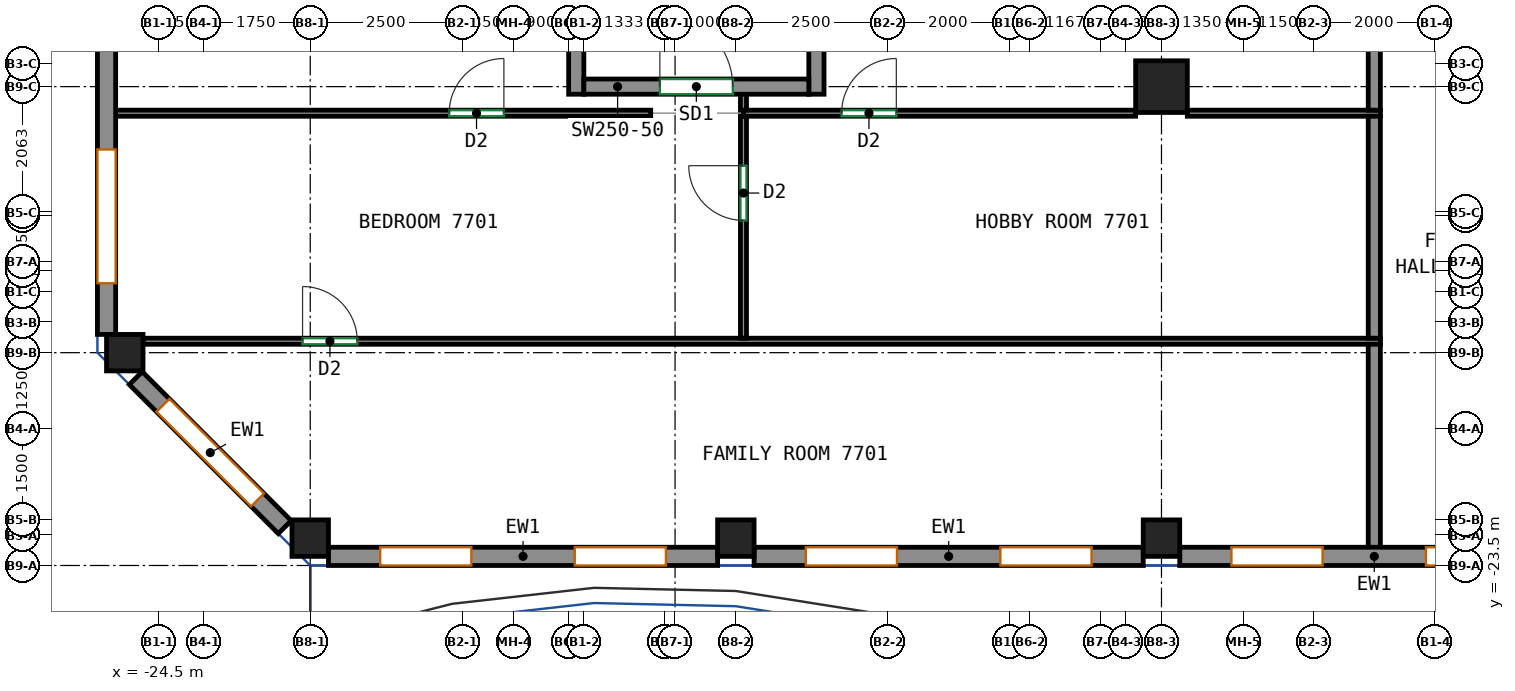
"""IFC4 building model, lengths in metres.
Left out: names, types, materials, properties, quantities, classifications, styles, units other than length and angle.
Written with IfcOpenShell. Run it as: python <this file> out.ifc"""

import sys

from ifc_helpers import new_model, si_unit, direction, frame, frame_2d, origin, origin_2d, place, context, subcontext, project, spatial, rectangle, extrude, source, transform, mapped, element, fill, save


model = new_model("IFC4")
c1 = context("Model", 3, precision=1e-05, world=origin(), true_north=direction((0.0, 1.0)))
c2 = subcontext(c1, "Body", "Model", "MODEL_VIEW")
j1 = project(units=[si_unit("LENGTHUNIT", "METRE"), si_unit("PLANEANGLEUNIT", "RADIAN")], contexts=[c1])
p1 = place(None, origin())
s1 = spatial("IfcSite", under=j1, at=p1, CompositionType="ELEMENT")
p2 = place(p1, origin())
s2 = spatial("IfcBuilding", under=s1, at=p2, CompositionType="ELEMENT")
p3 = place(p2, frame((0.0, 0.0, 308.6)))
s3 = spatial("IfcBuildingStorey", under=s2, at=p3, CompositionType="ELEMENT", Elevation=308.6)
m1 = source(origin(), c2, "Body", "SweptSolid", [
    extrude(rectangle(XDim=0.6, YDim=0.6, at=origin_2d()), origin(), (0.0, 0.0, 1.0), 3.12),
])
for number, where, z_axis, x_axis in (
    (1, (-25.05, -20.0, 0.0), (0.0, 0.0, 1.0), (1.0, 0.0, 0.0)),
    (2, (-22.0, -23.05, 0.0), (0.0, 0.0, 1.0), (1.0, 0.0, 0.0)),
    (3, (-15.0, -23.05, 0.0), (0.0, 0.0, 1.0), (1.0, 0.0, 0.0)),
    (4, (-8.0, -23.05, 0.0), (0.0, 0.0, 1.0), (1.0, 0.0, 0.0)),
):
    element("IfcColumn", number, at=place(p3, frame(where, z_axis=z_axis, x_axis=x_axis)), inside=s3, PredefinedType="COLUMN", context=c2, shape_type="MappedRepresentation", body=[
        mapped(m1, transform((0.0, 0.0, 0.0))),
    ])
m2 = source(origin(), c2, "Body", "SweptSolid", [
    extrude(rectangle(XDim=0.85, YDim=0.85, at=origin_2d()), origin(), (0.0, 0.0, 1.0), 3.12),
])
p4 = place(p3, frame((-8.0, -15.625, 0.0), z_axis=(0.0, 0.0, 1.0), x_axis=(1.0, 0.0, 0.0)))
e5 = element("IfcColumn", 5, at=p4, inside=s3, PredefinedType="COLUMN", context=c2, shape_type="MappedRepresentation", body=[
    mapped(m2, transform((0.0, 0.0, 0.0))),
])
m3 = source(origin(), c2, "Body", "SweptSolid", [
    extrude(rectangle(XDim=8.0, YDim=0.25, at=frame_2d((4.0, 0.0))), origin(), (0.0, 0.0, 1.0), 3.12),
])
for number, where, z_axis, x_axis in (
    (6, (-17.625, -15.75, 0.0), (0.0, 0.0, 1.0), (0.0, 1.0, 0.0)),
    (7, (-13.675, -15.75, 0.0), (0.0, 0.0, 1.0), (0.0, 1.0, 0.0)),
):
    element("IfcWall", number, at=place(p3, frame(where, z_axis=z_axis, x_axis=x_axis)), inside=s3, PredefinedType="SHEAR", context=c2, shape_type="MappedRepresentation", body=[
        mapped(m3, transform((0.0, 0.0, 0.0))),
    ])
m4 = source(origin(), c2, "Body", "SweptSolid", [
    extrude(rectangle(XDim=3.7, YDim=0.25, at=frame_2d((1.85, 0.0))), origin(), (0.0, 0.0, 1.0), 3.12),
])
p5 = place(p3, frame((-17.5, -15.625, 0.0), z_axis=(0.0, 0.0, 1.0), x_axis=(1.0, 0.0, 0.0)))
e8 = element("IfcWall", 8, at=p5, inside=s3, PredefinedType="SHEAR", context=c2, shape_type="MappedRepresentation", body=[
    mapped(m4, transform((0.0, 0.0, 0.0))),
])
p6 = place(p5, frame((1.25, 0.0, 0.0)))
e9 = element("IfcOpeningElement", 9, at=p6, cuts=e8, PredefinedType="OPENING", context=c2, shape_type="SweptSolid", body=[
    extrude(rectangle(XDim=1.2, YDim=2.1, at=frame_2d((0.6, 1.05))), frame((0.0, 0.135, 0.0), z_axis=(0.0, -1.0, 0.0), x_axis=(1.0, 0.0, 0.0)), (0.0, 0.0, 1.0), 0.27),
])
m5 = source(origin(), c2, "Body", "SweptSolid", [
    extrude(rectangle(XDim=6.4, YDim=0.3, at=frame_2d((3.2, 0.0))), origin(), (0.0, 0.0, 1.0), 3.12),
])
p7 = place(p3, frame((-21.7, -23.35, 0.0), z_axis=(0.0, 0.0, 1.0), x_axis=(1.0, 0.0, 0.0)))
e10 = element("IfcWall", 10, at=p7, inside=s3, PredefinedType="SOLIDWALL", context=c2, shape_type="MappedRepresentation", body=[
    mapped(m5, transform((0.0, 0.0, 0.0))),
])
p8 = place(p7, frame((0.85, 0.0, 0.8)))
e11 = element("IfcOpeningElement", 11, at=p8, cuts=e10, PredefinedType="OPENING", context=c2, shape_type="SweptSolid", body=[
    extrude(rectangle(XDim=1.5, YDim=2.05, at=frame_2d((0.75, 1.025))), frame((0.0, 0.16, 0.0), z_axis=(0.0, -1.0, 0.0), x_axis=(1.0, 0.0, 0.0)), (0.0, 0.0, 1.0), 0.32),
])
p9 = place(p7, frame((4.05, 0.0, 0.8)))
e12 = element("IfcOpeningElement", 12, at=p9, cuts=e10, PredefinedType="OPENING", context=c2, shape_type="SweptSolid", body=[
    extrude(rectangle(XDim=1.5, YDim=2.05, at=frame_2d((0.75, 1.025))), frame((0.0, 0.16, 0.0), z_axis=(0.0, -1.0, 0.0), x_axis=(1.0, 0.0, 0.0)), (0.0, 0.0, 1.0), 0.32),
])
p10 = place(p3, frame((-14.7, -23.35, 0.0), z_axis=(0.0, 0.0, 1.0), x_axis=(1.0, 0.0, 0.0)))
e13 = element("IfcWall", 13, at=p10, inside=s3, PredefinedType="SOLIDWALL", context=c2, shape_type="MappedRepresentation", body=[
    mapped(m5, transform((0.0, 0.0, 0.0))),
])
p11 = place(p10, frame((0.85, 0.0, 0.8)))
e14 = element("IfcOpeningElement", 14, at=p11, cuts=e13, PredefinedType="OPENING", context=c2, shape_type="SweptSolid", body=[
    extrude(rectangle(XDim=1.5, YDim=2.05, at=frame_2d((0.75, 1.025))), frame((0.0, 0.16, 0.0), z_axis=(0.0, -1.0, 0.0), x_axis=(1.0, 0.0, 0.0)), (0.0, 0.0, 1.0), 0.32),
])
p12 = place(p10, frame((4.05, 0.0, 0.8)))
e15 = element("IfcOpeningElement", 15, at=p12, cuts=e13, PredefinedType="OPENING", context=c2, shape_type="SweptSolid", body=[
    extrude(rectangle(XDim=1.5, YDim=2.05, at=frame_2d((0.75, 1.025))), frame((0.0, 0.16, 0.0), z_axis=(0.0, -1.0, 0.0), x_axis=(1.0, 0.0, 0.0)), (0.0, 0.0, 1.0), 0.32),
])
p13 = place(p3, frame((-7.7, -23.35, 0.0), z_axis=(0.0, 0.0, 1.0), x_axis=(1.0, 0.0, 0.0)))
e16 = element("IfcWall", 16, at=p13, inside=s3, PredefinedType="SOLIDWALL", context=c2, shape_type="MappedRepresentation", body=[
    mapped(m5, transform((0.0, 0.0, 0.0))),
])
p14 = place(p13, frame((0.85, 0.0, 0.8)))
e17 = element("IfcOpeningElement", 17, at=p14, cuts=e16, PredefinedType="OPENING", context=c2, shape_type="SweptSolid", body=[
    extrude(rectangle(XDim=1.5, YDim=2.05, at=frame_2d((0.75, 1.025))), frame((0.0, 0.16, 0.0), z_axis=(0.0, -1.0, 0.0), x_axis=(1.0, 0.0, 0.0)), (0.0, 0.0, 1.0), 0.32),
])
p15 = place(p13, frame((4.05, 0.0, 0.8)))
e18 = element("IfcOpeningElement", 18, at=p15, cuts=e16, PredefinedType="OPENING", context=c2, shape_type="SweptSolid", body=[
    extrude(rectangle(XDim=1.5, YDim=2.05, at=frame_2d((0.75, 1.025))), frame((0.0, 0.16, 0.0), z_axis=(0.0, -1.0, 0.0), x_axis=(1.0, 0.0, 0.0)), (0.0, 0.0, 1.0), 0.32),
])
m6 = source(origin(), c2, "Body", "SweptSolid", [
    extrude(rectangle(XDim=11.65, YDim=0.3, at=frame_2d((5.825, 0.0))), origin(), (0.0, 0.0, 1.0), 3.12),
])
p16 = place(p3, frame((-25.35, -8.05, 0.0), z_axis=(0.0, 0.0, 1.0), x_axis=(0.0, -1.0, 0.0)))
e19 = element("IfcWall", 19, at=p16, inside=s3, PredefinedType="SOLIDWALL", context=c2, shape_type="MappedRepresentation", body=[
    mapped(m6, transform((0.0, 0.0, 0.0))),
])
p17 = place(p16, frame((0.842, 0.0, 0.8)))
e20 = element("IfcOpeningElement", 20, at=p17, cuts=e19, PredefinedType="OPENING", context=c2, shape_type="SweptSolid", body=[
    extrude(rectangle(XDim=2.2, YDim=2.05, at=frame_2d((1.1, 1.025))), frame((0.0, 0.16, 0.0), z_axis=(0.0, -1.0, 0.0), x_axis=(1.0, 0.0, 0.0)), (0.0, 0.0, 1.0), 0.32),
])
p18 = place(p16, frame((4.725, 0.0, 0.8)))
e21 = element("IfcOpeningElement", 21, at=p18, cuts=e19, PredefinedType="OPENING", context=c2, shape_type="SweptSolid", body=[
    extrude(rectangle(XDim=2.2, YDim=2.05, at=frame_2d((1.1, 1.025))), frame((0.0, 0.16, 0.0), z_axis=(0.0, -1.0, 0.0), x_axis=(1.0, 0.0, 0.0)), (0.0, 0.0, 1.0), 0.32),
])
p19 = place(p16, frame((8.608, 0.0, 0.8)))
e22 = element("IfcOpeningElement", 22, at=p19, cuts=e19, PredefinedType="OPENING", context=c2, shape_type="SweptSolid", body=[
    extrude(rectangle(XDim=2.2, YDim=2.05, at=frame_2d((1.1, 1.025))), frame((0.0, 0.16, 0.0), z_axis=(0.0, -1.0, 0.0), x_axis=(1.0, 0.0, 0.0)), (0.0, 0.0, 1.0), 0.32),
])
m7 = source(origin(), c2, "Body", "SweptSolid", [
    extrude(rectangle(XDim=3.465, YDim=0.3, at=frame_2d((1.732, 0.0))), origin(), (0.0, 0.0, 1.0), 3.12),
])
p20 = place(p3, frame((-24.869, -20.419, 0.0), z_axis=(0.0, 0.0, 1.0), x_axis=(0.707106781187, -0.707106781187, 0.0)))
e23 = element("IfcWall", 23, at=p20, inside=s3, PredefinedType="SOLIDWALL", context=c2, shape_type="MappedRepresentation", body=[
    mapped(m7, transform((0.0, 0.0, 0.0))),
])
p21 = place(p20, frame((0.632, 0.0, 0.8)))
e24 = element("IfcOpeningElement", 24, at=p21, cuts=e23, PredefinedType="OPENING", context=c2, shape_type="SweptSolid", body=[
    extrude(rectangle(XDim=2.2, YDim=2.05, at=frame_2d((1.1, 1.025))), frame((0.0, 0.16, 0.0), z_axis=(0.0, -1.0, 0.0), x_axis=(1.0, 0.0, 0.0)), (0.0, 0.0, 1.0), 0.32),
])
p22 = place(p3, frame((-24.75, -19.812, 0.0), z_axis=(0.0, 0.0, 1.0), x_axis=(1.0, 0.0, 0.0)))
e25 = element("IfcWall", 25, at=p22, inside=s3, PredefinedType="PARTITIONING", context=c2, shape_type="SweptSolid", body=[
    extrude(rectangle(XDim=20.35, YDim=0.1, at=frame_2d((10.175, 0.0))), origin(), (0.0, 0.0, 1.0), 3.12),
])
p23 = place(p22, frame((2.624, 0.0, 0.0)))
e26 = element("IfcOpeningElement", 26, at=p23, cuts=e25, PredefinedType="OPENING", context=c2, shape_type="SweptSolid", body=[
    extrude(rectangle(XDim=0.9, YDim=2.1, at=frame_2d((0.45, 1.05))), frame((0.0, 0.06, 0.0), z_axis=(0.0, -1.0, 0.0), x_axis=(1.0, 0.0, 0.0)), (0.0, 0.0, 1.0), 0.12),
])
p24 = place(p3, frame((-4.5, -23.25, 0.0), z_axis=(0.0, 0.0, 1.0), x_axis=(0.0, 1.0, 0.0)))
e27 = element("IfcWall", 27, at=p24, inside=s3, PredefinedType="PARTITIONING", context=c2, shape_type="SweptSolid", body=[
    extrude(rectangle(XDim=3.388, YDim=0.2, at=frame_2d((1.694, 0.0))), origin(), (0.0, 0.0, 1.0), 3.12),
])
p25 = place(p3, frame((-14.875, -19.762, 0.0), z_axis=(0.0, 0.0, 1.0), x_axis=(0.0, 1.0, 0.0)))
e28 = element("IfcWall", 28, at=p25, inside=s3, PredefinedType="PARTITIONING", context=c2, shape_type="SweptSolid", body=[
    extrude(rectangle(XDim=3.65, YDim=0.1, at=frame_2d((1.825, 0.0))), origin(), (0.0, 0.0, 1.0), 3.12),
])
p26 = place(p25, frame((1.937, 0.0, 0.0)))
e29 = element("IfcOpeningElement", 29, at=p26, cuts=e28, PredefinedType="OPENING", context=c2, shape_type="SweptSolid", body=[
    extrude(rectangle(XDim=0.9, YDim=2.1, at=frame_2d((0.45, 1.05))), frame((0.0, 0.06, 0.0), z_axis=(0.0, -1.0, 0.0), x_axis=(1.0, 0.0, 0.0)), (0.0, 0.0, 1.0), 0.12),
])
p27 = place(p3, frame((-25.25, -16.062, 0.0), z_axis=(0.0, 0.0, 1.0), x_axis=(1.0, 0.0, 0.0)))
e30 = element("IfcWall", 30, at=p27, inside=s3, PredefinedType="PARTITIONING", context=c2, shape_type="SweptSolid", body=[
    extrude(rectangle(XDim=8.85, YDim=0.1, at=frame_2d((4.425, 0.0))), origin(), (0.0, 0.0, 1.0), 3.12),
])
p28 = place(p27, frame((5.535, 0.0, 0.0)))
e31 = element("IfcOpeningElement", 31, at=p28, cuts=e30, PredefinedType="OPENING", context=c2, shape_type="SweptSolid", body=[
    extrude(rectangle(XDim=0.9, YDim=2.1, at=frame_2d((0.45, 1.05))), frame((0.0, 0.06, 0.0), z_axis=(0.0, -1.0, 0.0), x_axis=(1.0, 0.0, 0.0)), (0.0, 0.0, 1.0), 0.12),
])
p29 = place(p3, frame((-7.575, -16.062, 0.0), z_axis=(0.0, 0.0, 1.0), x_axis=(1.0, 0.0, 0.0)))
e32 = element("IfcWall", 32, at=p29, inside=s3, PredefinedType="PARTITIONING", context=c2, shape_type="SweptSolid", body=[
    extrude(rectangle(XDim=3.175, YDim=0.1, at=frame_2d((1.587, 0.0))), origin(), (0.0, 0.0, 1.0), 3.12),
])
p30 = place(p3, frame((-14.875, -16.062, 0.0), z_axis=(0.0, 0.0, 1.0), x_axis=(1.0, 0.0, 0.0)))
e33 = element("IfcWall", 33, at=p30, inside=s3, PredefinedType="PARTITIONING", context=c2, shape_type="SweptSolid", body=[
    extrude(rectangle(XDim=6.45, YDim=0.1, at=frame_2d((3.225, 0.0))), origin(), (0.0, 0.0, 1.0), 3.12),
])
p31 = place(p30, frame((1.614, 0.0, 0.0)))
e34 = element("IfcOpeningElement", 34, at=p31, cuts=e33, PredefinedType="OPENING", context=c2, shape_type="SweptSolid", body=[
    extrude(rectangle(XDim=0.9, YDim=2.1, at=frame_2d((0.45, 1.05))), frame((0.0, 0.06, 0.0), z_axis=(0.0, -1.0, 0.0), x_axis=(1.0, 0.0, 0.0)), (0.0, 0.0, 1.0), 0.12),
])
p32 = place(p3, frame((-4.5, -19.762, 0.0), z_axis=(0.0, 0.0, 1.0), x_axis=(0.0, 1.0, 0.0)))
e35 = element("IfcWall", 35, at=p32, inside=s3, PredefinedType="PARTITIONING", context=c2, shape_type="SweptSolid", body=[
    extrude(rectangle(XDim=3.65, YDim=0.2, at=frame_2d((1.825, 0.0))), origin(), (0.0, 0.0, 1.0), 3.12),
])
p33 = place(p3, frame((-14.875, -16.012, 0.0), z_axis=(0.0, 0.0, 1.0), x_axis=(0.0, 1.0, 0.0)))
e36 = element("IfcWall", 36, at=p33, inside=s3, PredefinedType="PARTITIONING", context=c2, shape_type="SweptSolid", body=[
    extrude(rectangle(XDim=0.312, YDim=0.1, at=frame_2d((0.156, 0.0))), origin(), (0.0, 0.0, 1.0), 3.12),
])
p34 = place(p3, frame((-4.5, -16.012, 0.0), z_axis=(0.0, 0.0, 1.0), x_axis=(0.0, 1.0, 0.0)))
e37 = element("IfcWall", 37, at=p34, inside=s3, PredefinedType="PARTITIONING", context=c2, shape_type="SweptSolid", body=[
    extrude(rectangle(XDim=3.7, YDim=0.2, at=frame_2d((1.85, 0.0))), origin(), (0.0, 0.0, 1.0), 3.12),
])
p35 = place(p8, origin())
e38 = element("IfcWindow", 38, at=p35, inside=s3, PartitioningType="SINGLE_PANEL", PredefinedType="WINDOW", context=c2, shape_type="SweptSolid", body=[
    extrude(rectangle(XDim=1.5, YDim=2.05, at=frame_2d((0.75, 1.025))), frame((0.0, 0.03, 0.0), z_axis=(0.0, -1.0, 0.0), x_axis=(1.0, 0.0, 0.0)), (0.0, 0.0, 1.0), 0.06),
])
fill(e11, e38)
p36 = place(p9, origin())
e39 = element("IfcWindow", 39, at=p36, inside=s3, PartitioningType="SINGLE_PANEL", PredefinedType="WINDOW", context=c2, shape_type="SweptSolid", body=[
    extrude(rectangle(XDim=1.5, YDim=2.05, at=frame_2d((0.75, 1.025))), frame((0.0, 0.03, 0.0), z_axis=(0.0, -1.0, 0.0), x_axis=(1.0, 0.0, 0.0)), (0.0, 0.0, 1.0), 0.06),
])
fill(e12, e39)
p37 = place(p11, origin())
e40 = element("IfcWindow", 40, at=p37, inside=s3, PartitioningType="SINGLE_PANEL", PredefinedType="WINDOW", context=c2, shape_type="SweptSolid", body=[
    extrude(rectangle(XDim=1.5, YDim=2.05, at=frame_2d((0.75, 1.025))), frame((0.0, 0.03, 0.0), z_axis=(0.0, -1.0, 0.0), x_axis=(1.0, 0.0, 0.0)), (0.0, 0.0, 1.0), 0.06),
])
fill(e14, e40)
p38 = place(p12, origin())
e41 = element("IfcWindow", 41, at=p38, inside=s3, PartitioningType="SINGLE_PANEL", PredefinedType="WINDOW", context=c2, shape_type="SweptSolid", body=[
    extrude(rectangle(XDim=1.5, YDim=2.05, at=frame_2d((0.75, 1.025))), frame((0.0, 0.03, 0.0), z_axis=(0.0, -1.0, 0.0), x_axis=(1.0, 0.0, 0.0)), (0.0, 0.0, 1.0), 0.06),
])
fill(e15, e41)
p39 = place(p14, origin())
e42 = element("IfcWindow", 42, at=p39, inside=s3, PartitioningType="SINGLE_PANEL", PredefinedType="WINDOW", context=c2, shape_type="SweptSolid", body=[
    extrude(rectangle(XDim=1.5, YDim=2.05, at=frame_2d((0.75, 1.025))), frame((0.0, 0.03, 0.0), z_axis=(0.0, -1.0, 0.0), x_axis=(1.0, 0.0, 0.0)), (0.0, 0.0, 1.0), 0.06),
])
fill(e17, e42)
p40 = place(p15, origin())
e43 = element("IfcWindow", 43, at=p40, inside=s3, PartitioningType="SINGLE_PANEL", PredefinedType="WINDOW", context=c2, shape_type="SweptSolid", body=[
    extrude(rectangle(XDim=1.5, YDim=2.05, at=frame_2d((0.75, 1.025))), frame((0.0, 0.03, 0.0), z_axis=(0.0, -1.0, 0.0), x_axis=(1.0, 0.0, 0.0)), (0.0, 0.0, 1.0), 0.06),
])
fill(e18, e43)
p41 = place(p19, origin())
e44 = element("IfcWindow", 44, at=p41, inside=s3, PartitioningType="SINGLE_PANEL", PredefinedType="WINDOW", context=c2, shape_type="SweptSolid", body=[
    extrude(rectangle(XDim=2.2, YDim=2.05, at=frame_2d((1.1, 1.025))), frame((0.0, 0.03, 0.0), z_axis=(0.0, -1.0, 0.0), x_axis=(1.0, 0.0, 0.0)), (0.0, 0.0, 1.0), 0.06),
])
fill(e22, e44)
p42 = place(p21, origin())
e45 = element("IfcWindow", 45, at=p42, inside=s3, PartitioningType="SINGLE_PANEL", PredefinedType="WINDOW", context=c2, shape_type="SweptSolid", body=[
    extrude(rectangle(XDim=2.2, YDim=2.05, at=frame_2d((1.1, 1.025))), frame((0.0, 0.03, 0.0), z_axis=(0.0, -1.0, 0.0), x_axis=(1.0, 0.0, 0.0)), (0.0, 0.0, 1.0), 0.06),
])
fill(e24, e45)
p43 = place(p6, origin())
e46 = element("IfcDoor", 46, at=p43, inside=s3, OperationType="DOUBLE_DOOR_SINGLE_SWING", PredefinedType="DOOR", context=c2, shape_type="SweptSolid", body=[
    extrude(rectangle(XDim=1.2, YDim=2.1, at=frame_2d((0.6, 1.05))), frame((0.0, 0.025, 0.0), z_axis=(0.0, -1.0, 0.0), x_axis=(1.0, 0.0, 0.0)), (0.0, 0.0, 1.0), 0.05),
])
fill(e9, e46)
p44 = place(p23, origin())
e47 = element("IfcDoor", 47, at=p44, inside=s3, OperationType="SINGLE_SWING_LEFT", PredefinedType="DOOR", context=c2, shape_type="SweptSolid", body=[
    extrude(rectangle(XDim=0.9, YDim=2.1, at=frame_2d((0.45, 1.05))), frame((0.0, 0.025, 0.0), z_axis=(0.0, -1.0, 0.0), x_axis=(1.0, 0.0, 0.0)), (0.0, 0.0, 1.0), 0.05),
])
fill(e26, e47)
p45 = place(p26, origin())
e48 = element("IfcDoor", 48, at=p45, inside=s3, OperationType="SINGLE_SWING_RIGHT", PredefinedType="DOOR", context=c2, shape_type="SweptSolid", body=[
    extrude(rectangle(XDim=0.9, YDim=2.1, at=frame_2d((0.45, 1.05))), frame((0.0, 0.025, 0.0), z_axis=(0.0, -1.0, 0.0), x_axis=(1.0, 0.0, 0.0)), (0.0, 0.0, 1.0), 0.05),
])
fill(e29, e48)
p46 = place(p28, origin())
e49 = element("IfcDoor", 49, at=p46, inside=s3, OperationType="SINGLE_SWING_RIGHT", PredefinedType="DOOR", context=c2, shape_type="SweptSolid", body=[
    extrude(rectangle(XDim=0.9, YDim=2.1, at=frame_2d((0.45, 1.05))), frame((0.0, 0.025, 0.0), z_axis=(0.0, -1.0, 0.0), x_axis=(1.0, 0.0, 0.0)), (0.0, 0.0, 1.0), 0.05),
])
fill(e31, e49)
p47 = place(p31, origin())
e50 = element("IfcDoor", 50, at=p47, inside=s3, OperationType="SINGLE_SWING_RIGHT", PredefinedType="DOOR", context=c2, shape_type="SweptSolid", body=[
    extrude(rectangle(XDim=0.9, YDim=2.1, at=frame_2d((0.45, 1.05))), frame((0.0, 0.025, 0.0), z_axis=(0.0, -1.0, 0.0), x_axis=(1.0, 0.0, 0.0)), (0.0, 0.0, 1.0), 0.05),
])
fill(e34, e50)
save(model, sys.argv[1])
